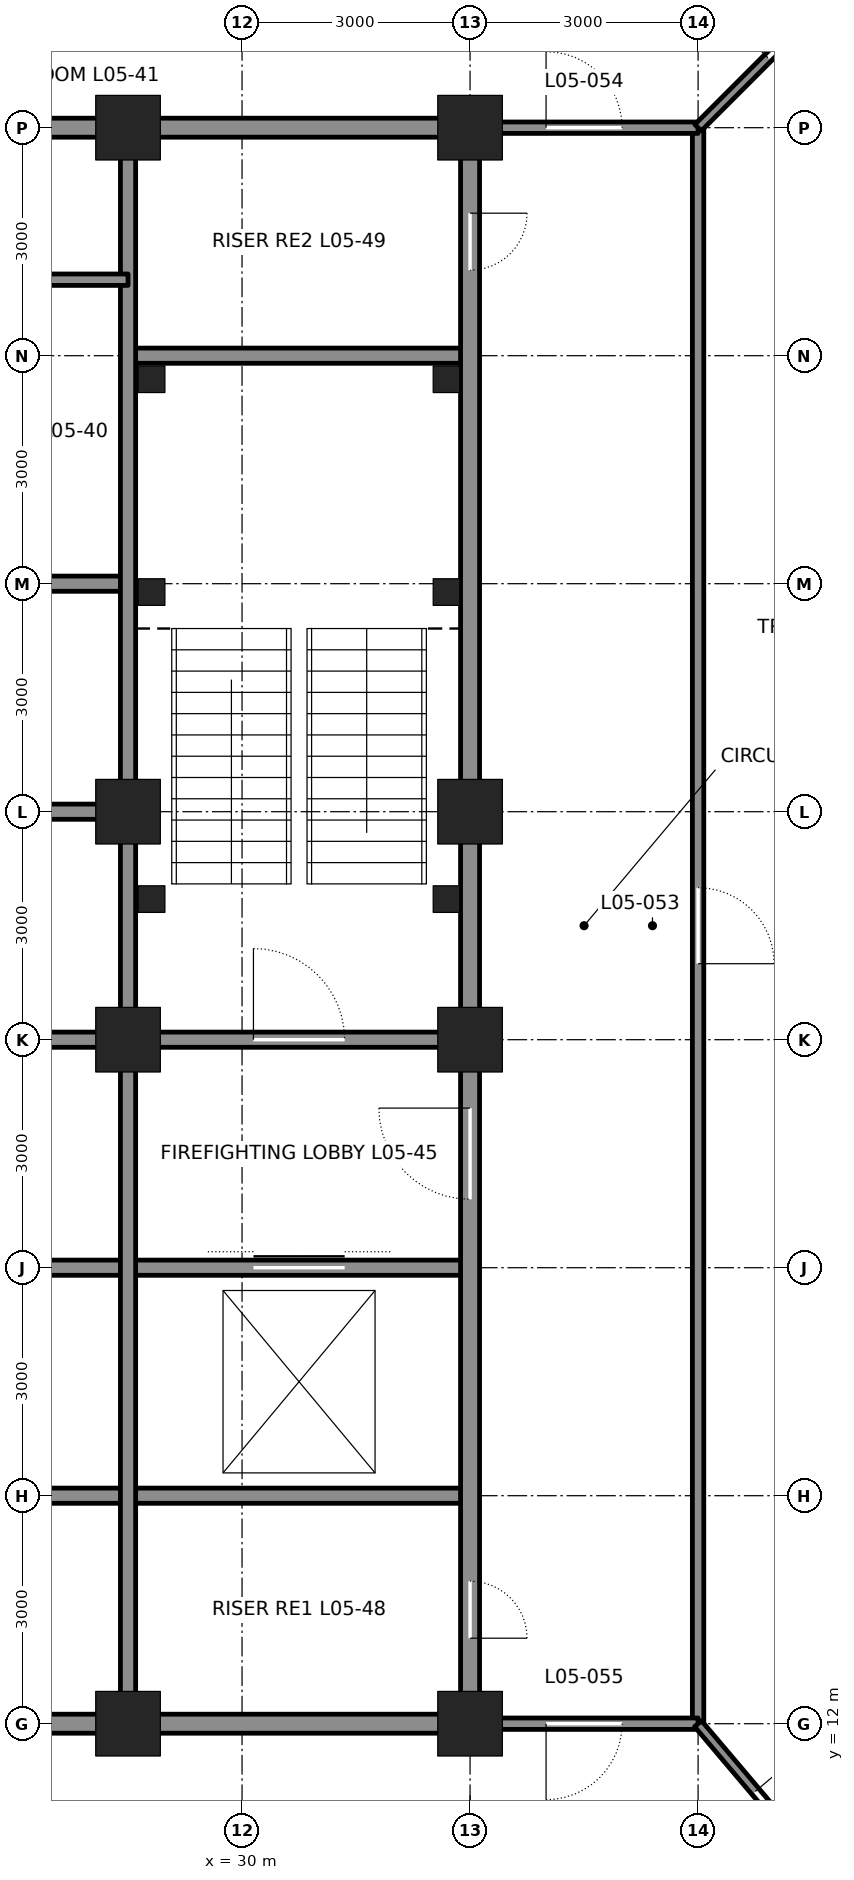
"""IFC4 building model, lengths in metres.
Left out: names, types, materials, properties, quantities, classifications, styles, units other than length and angle.
Written with IfcOpenShell. Run it as: python <this file> out.ifc"""

import sys

from ifc_helpers import new_model, si_unit, direction, frame, frame_2d, origin, origin_2d, place, context, subcontext, project, spatial, rectangle, hollow_rectangle, extrude, element, fill, save


model = new_model("IFC4")
c1 = context("Model", 3, precision=1e-05, world=origin(), true_north=direction((0.0, 1.0)))
c2 = subcontext(c1, "Body", "Model", "MODEL_VIEW")
j1 = project(units=[si_unit("LENGTHUNIT", "METRE"), si_unit("PLANEANGLEUNIT", "RADIAN")], contexts=[c1])
p1 = place(None, origin())
s1 = spatial("IfcSite", under=j1, at=p1, CompositionType="ELEMENT")
p2 = place(p1, origin())
s2 = spatial("IfcBuilding", under=s1, at=p2, CompositionType="ELEMENT")
p3 = place(p2, frame((0.0, 0.0, 28.8)))
s3 = spatial("IfcBuildingStorey", under=s2, at=p3, CompositionType="ELEMENT", Elevation=28.8)
for number, where, z_axis, x_axis in (
    (1, (28.5, 12.0, 0.0), (0.0, 0.0, 1.0), (1.0, 0.0, 0.0)),
    (2, (33.0, 12.0, 0.0), (0.0, 0.0, 1.0), (1.0, 0.0, 0.0)),
    (3, (28.5, 33.0, 0.0), (0.0, 0.0, 1.0), (1.0, 0.0, 0.0)),
    (4, (33.0, 33.0, 0.0), (0.0, 0.0, 1.0), (1.0, 0.0, 0.0)),
    (5, (33.0, 21.0, 0.0), (0.0, 0.0, 1.0), (1.0, 0.0, 0.0)),
    (6, (33.0, 24.0, 0.0), (0.0, 0.0, 1.0), (1.0, 0.0, 0.0)),
    (7, (28.5, 21.0, 0.0), (0.0, 0.0, 1.0), (1.0, 0.0, 0.0)),
    (8, (28.5, 24.0, 0.0), (0.0, 0.0, 1.0), (1.0, 0.0, 0.0)),
):
    element("IfcColumn", number, at=place(p3, frame(where, z_axis=z_axis, x_axis=x_axis)), inside=s3, PredefinedType="COLUMN", context=c2, shape_type="SweptSolid", body=[
        extrude(hollow_rectangle(XDim=0.85, YDim=0.85, WallThickness=0.085, at=origin_2d()), origin(), (0.0, 0.0, 1.0), 4.5),
    ])
p4 = place(p3, frame((25.75, 12.0, 0.0), z_axis=(0.0, 0.0, 1.0), x_axis=(1.0, 0.0, 0.0)))
e9 = element("IfcWall", 9, at=p4, inside=s3, PredefinedType="SOLIDWALL", context=c2, shape_type="SweptSolid", body=[
    extrude(rectangle(XDim=2.5, YDim=0.25, at=frame_2d((1.25, 0.0))), origin(), (0.0, 0.0, 1.0), 3.181),
])
p5 = place(p3, frame((28.75, 12.0, 0.0), z_axis=(0.0, 0.0, 1.0), x_axis=(1.0, 0.0, 0.0)))
e10 = element("IfcWall", 10, at=p5, inside=s3, PredefinedType="SOLIDWALL", context=c2, shape_type="SweptSolid", body=[
    extrude(rectangle(XDim=4.0, YDim=0.25, at=frame_2d((2.0, 0.0))), origin(), (0.0, 0.0, 1.0), 3.181),
])
p6 = place(p3, frame((25.5, 15.0, 0.0), z_axis=(0.0, 0.0, 1.0), x_axis=(1.0, 0.0, 0.0)))
e11 = element("IfcWall", 11, at=p6, inside=s3, PredefinedType="SOLIDWALL", context=c2, shape_type="SweptSolid", body=[
    extrude(rectangle(XDim=7.5, YDim=0.2, at=frame_2d((3.75, 0.0))), origin(), (0.0, 0.0, 1.0), 4.34),
])
p7 = place(p3, frame((25.5, 24.0, 0.0), z_axis=(0.0, 0.0, 1.0), x_axis=(1.0, 0.0, 0.0)))
e12 = element("IfcWall", 12, at=p7, inside=s3, PredefinedType="SOLIDWALL", context=c2, shape_type="SweptSolid", body=[
    extrude(rectangle(XDim=2.75, YDim=0.2, at=frame_2d((1.375, 0.0))), origin(), (0.0, 0.0, 1.0), 3.39),
])
p8 = place(p3, frame((25.5, 27.0, 0.0), z_axis=(0.0, 0.0, 1.0), x_axis=(1.0, 0.0, 0.0)))
e13 = element("IfcWall", 13, at=p8, inside=s3, PredefinedType="SOLIDWALL", context=c2, shape_type="SweptSolid", body=[
    extrude(rectangle(XDim=3.0, YDim=0.2, at=frame_2d((1.5, 0.0))), origin(), (0.0, 0.0, 1.0), 4.34),
])
p9 = place(p3, frame((28.5, 30.0, 0.0), z_axis=(0.0, 0.0, 1.0), x_axis=(1.0, 0.0, 0.0)))
e14 = element("IfcWall", 14, at=p9, inside=s3, PredefinedType="SOLIDWALL", context=c2, shape_type="SweptSolid", body=[
    extrude(rectangle(XDim=4.5, YDim=0.2, at=frame_2d((2.25, 0.0))), origin(), (0.0, 0.0, 1.0), 4.34),
])
p10 = place(p3, frame((25.75, 33.0, 0.0), z_axis=(0.0, 0.0, 1.0), x_axis=(1.0, 0.0, 0.0)))
e15 = element("IfcWall", 15, at=p10, inside=s3, PredefinedType="SOLIDWALL", context=c2, shape_type="SweptSolid", body=[
    extrude(rectangle(XDim=2.5, YDim=0.25, at=frame_2d((1.25, 0.0))), origin(), (0.0, 0.0, 1.0), 3.181),
])
p11 = place(p3, frame((28.75, 33.0, 0.0), z_axis=(0.0, 0.0, 1.0), x_axis=(1.0, 0.0, 0.0)))
e16 = element("IfcWall", 16, at=p11, inside=s3, PredefinedType="SOLIDWALL", context=c2, shape_type="SweptSolid", body=[
    extrude(rectangle(XDim=4.0, YDim=0.25, at=frame_2d((2.0, 0.0))), origin(), (0.0, 0.0, 1.0), 3.181),
])
p12 = place(p3, frame((25.5, 18.0, 0.0), z_axis=(0.0, 0.0, 1.0), x_axis=(1.0, 0.0, 0.0)))
e17 = element("IfcWall", 17, at=p12, inside=s3, PredefinedType="SOLIDWALL", context=c2, shape_type="SweptSolid", body=[
    extrude(rectangle(XDim=7.5, YDim=0.2, at=frame_2d((3.75, 0.0))), origin(), (0.0, 0.0, 1.0), 4.34),
])
p13 = place(p12, frame((4.65, 0.0, 0.0)))
e18 = element("IfcOpeningElement", 18, at=p13, cuts=e17, PredefinedType="OPENING", context=c2, shape_type="SweptSolid", body=[
    extrude(rectangle(XDim=1.2, YDim=2.1, at=frame_2d((0.6, 1.05))), frame((0.0, 0.11, 0.0), z_axis=(0.0, -1.0, 0.0), x_axis=(1.0, 0.0, 0.0)), (0.0, 0.0, 1.0), 0.22),
])
p14 = place(p3, frame((25.5, 21.0, 0.0), z_axis=(0.0, 0.0, 1.0), x_axis=(1.0, 0.0, 0.0)))
e19 = element("IfcWall", 19, at=p14, inside=s3, PredefinedType="SOLIDWALL", context=c2, shape_type="SweptSolid", body=[
    extrude(rectangle(XDim=2.75, YDim=0.2, at=frame_2d((1.375, 0.0))), origin(), (0.0, 0.0, 1.0), 3.39),
])
p15 = place(p3, frame((28.75, 21.0, 0.0), z_axis=(0.0, 0.0, 1.0), x_axis=(1.0, 0.0, 0.0)))
e20 = element("IfcWall", 20, at=p15, inside=s3, PredefinedType="SOLIDWALL", context=c2, shape_type="SweptSolid", body=[
    extrude(rectangle(XDim=4.0, YDim=0.2, at=frame_2d((2.0, 0.0))), origin(), (0.0, 0.0, 1.0), 3.39),
])
p16 = place(p15, frame((1.4, 0.0, 0.0)))
e21 = element("IfcOpeningElement", 21, at=p16, cuts=e20, PredefinedType="OPENING", context=c2, shape_type="SweptSolid", body=[
    extrude(rectangle(XDim=1.2, YDim=2.1, at=frame_2d((0.6, 1.05))), frame((0.0, 0.11, 0.0), z_axis=(0.0, -1.0, 0.0), x_axis=(1.0, 0.0, 0.0)), (0.0, 0.0, 1.0), 0.22),
])
p17 = place(p3, frame((28.5, 12.25, 0.0), z_axis=(0.0, 0.0, 1.0), x_axis=(0.0, 1.0, 0.0)))
e22 = element("IfcWall", 22, at=p17, inside=s3, PredefinedType="SOLIDWALL", context=c2, shape_type="SweptSolid", body=[
    extrude(rectangle(XDim=8.5, YDim=0.2, at=frame_2d((4.25, 0.0))), origin(), (0.0, 0.0, 1.0), 3.413),
])
p18 = place(p3, frame((28.5, 21.25, 0.0), z_axis=(0.0, 0.0, 1.0), x_axis=(0.0, 1.0, 0.0)))
e23 = element("IfcWall", 23, at=p18, inside=s3, PredefinedType="SOLIDWALL", context=c2, shape_type="SweptSolid", body=[
    extrude(rectangle(XDim=2.5, YDim=0.2, at=frame_2d((1.25, 0.0))), origin(), (0.0, 0.0, 1.0), 3.413),
])
p19 = place(p3, frame((28.5, 24.25, 0.0), z_axis=(0.0, 0.0, 1.0), x_axis=(0.0, 1.0, 0.0)))
e24 = element("IfcWall", 24, at=p19, inside=s3, PredefinedType="SOLIDWALL", context=c2, shape_type="SweptSolid", body=[
    extrude(rectangle(XDim=8.5, YDim=0.2, at=frame_2d((4.25, 0.0))), origin(), (0.0, 0.0, 1.0), 3.413),
])
p20 = place(p3, frame((33.0, 12.25, 0.0), z_axis=(0.0, 0.0, 1.0), x_axis=(0.0, 1.0, 0.0)))
e25 = element("IfcWall", 25, at=p20, inside=s3, PredefinedType="SOLIDWALL", context=c2, shape_type="SweptSolid", body=[
    extrude(rectangle(XDim=8.5, YDim=0.25, at=frame_2d((4.25, 0.0))), origin(), (0.0, 0.0, 1.0), 3.113),
])
p21 = place(p20, frame((6.65, 0.0, 0.0)))
e26 = element("IfcOpeningElement", 26, at=p21, cuts=e25, PredefinedType="OPENING", context=c2, shape_type="SweptSolid", body=[
    extrude(rectangle(XDim=1.2, YDim=2.1, at=frame_2d((0.6, 1.05))), frame((0.0, 0.135, 0.0), z_axis=(0.0, -1.0, 0.0), x_axis=(1.0, 0.0, 0.0)), (0.0, 0.0, 1.0), 0.27),
])
p22 = place(p20, frame((0.875, 0.0, 0.0)))
e27 = element("IfcOpeningElement", 27, at=p22, cuts=e25, PredefinedType="OPENING", context=c2, shape_type="SweptSolid", body=[
    extrude(rectangle(XDim=0.75, YDim=2.1, at=frame_2d((0.375, 1.05))), frame((0.0, 0.135, 0.0), z_axis=(0.0, -1.0, 0.0), x_axis=(1.0, 0.0, 0.0)), (0.0, 0.0, 1.0), 0.27),
])
p23 = place(p3, frame((33.0, 21.25, 0.0), z_axis=(0.0, 0.0, 1.0), x_axis=(0.0, 1.0, 0.0)))
e28 = element("IfcWall", 28, at=p23, inside=s3, PredefinedType="SOLIDWALL", context=c2, shape_type="SweptSolid", body=[
    extrude(rectangle(XDim=2.5, YDim=0.25, at=frame_2d((1.25, 0.0))), origin(), (0.0, 0.0, 1.0), 3.113),
])
p24 = place(p3, frame((33.0, 24.25, 0.0), z_axis=(0.0, 0.0, 1.0), x_axis=(0.0, 1.0, 0.0)))
e29 = element("IfcWall", 29, at=p24, inside=s3, PredefinedType="SOLIDWALL", context=c2, shape_type="SweptSolid", body=[
    extrude(rectangle(XDim=8.5, YDim=0.25, at=frame_2d((4.25, 0.0))), origin(), (0.0, 0.0, 1.0), 3.113),
])
p25 = place(p24, frame((6.875, 0.0, 0.0)))
e30 = element("IfcOpeningElement", 30, at=p25, cuts=e29, PredefinedType="OPENING", context=c2, shape_type="SweptSolid", body=[
    extrude(rectangle(XDim=0.75, YDim=2.1, at=frame_2d((0.375, 1.05))), frame((0.0, 0.135, 0.0), z_axis=(0.0, -1.0, 0.0), x_axis=(1.0, 0.0, 0.0)), (0.0, 0.0, 1.0), 0.27),
])
p26 = place(p3, frame((25.5, 31.0, 0.0), z_axis=(0.0, 0.0, 1.0), x_axis=(1.0, 0.0, 0.0)))
e31 = element("IfcWall", 31, at=p26, inside=s3, PredefinedType="PARTITIONING", context=c2, shape_type="SweptSolid", body=[
    extrude(rectangle(XDim=3.0, YDim=0.15, at=frame_2d((1.5, 0.0))), origin(), (0.0, 0.0, 1.0), 4.34),
])
p27 = place(p3, frame((36.0, 12.0, -0.3), z_axis=(0.0, 0.0, 1.0), x_axis=(0.0, 1.0, 0.0)))
e32 = element("IfcWall", 32, at=p27, inside=s3, PredefinedType="PARTITIONING", context=c2, shape_type="SweptSolid", body=[
    extrude(rectangle(XDim=21.0, YDim=0.15, at=frame_2d((10.5, 0.0))), origin(), (0.0, 0.0, 1.0), 4.34),
])
p28 = place(p27, frame((10.0, 0.0, 0.3)))
e33 = element("IfcOpeningElement", 33, at=p28, cuts=e32, PredefinedType="OPENING", context=c2, shape_type="SweptSolid", body=[
    extrude(rectangle(XDim=1.0, YDim=2.4, at=frame_2d((0.5, 1.2))), frame((0.0, 0.085, 0.0), z_axis=(0.0, -1.0, 0.0), x_axis=(1.0, 0.0, 0.0)), (0.0, 0.0, 1.0), 0.17),
])
p29 = place(p3, frame((33.0, 33.0, -0.3), z_axis=(0.0, 0.0, 1.0), x_axis=(1.0, 0.0, 0.0)))
e34 = element("IfcWall", 34, at=p29, inside=s3, PredefinedType="PARTITIONING", context=c2, shape_type="SweptSolid", body=[
    extrude(rectangle(XDim=3.0, YDim=0.15, at=frame_2d((1.5, 0.0))), origin(), (0.0, 0.0, 1.0), 3.481),
])
p30 = place(p29, frame((1.0, 0.0, 0.3)))
e35 = element("IfcOpeningElement", 35, at=p30, cuts=e34, PredefinedType="OPENING", context=c2, shape_type="SweptSolid", body=[
    extrude(rectangle(XDim=1.0, YDim=2.4, at=frame_2d((0.5, 1.2))), frame((0.0, 0.085, 0.0), z_axis=(0.0, -1.0, 0.0), x_axis=(1.0, 0.0, 0.0)), (0.0, 0.0, 1.0), 0.17),
])
p31 = place(p3, frame((33.0, 12.0, -0.3), z_axis=(0.0, 0.0, 1.0), x_axis=(1.0, 0.0, 0.0)))
e36 = element("IfcWall", 36, at=p31, inside=s3, PredefinedType="PARTITIONING", context=c2, shape_type="SweptSolid", body=[
    extrude(rectangle(XDim=3.0, YDim=0.15, at=frame_2d((1.5, 0.0))), origin(), (0.0, 0.0, 1.0), 3.481),
])
p32 = place(p31, frame((1.0, 0.0, 0.3)))
e37 = element("IfcOpeningElement", 37, at=p32, cuts=e36, PredefinedType="OPENING", context=c2, shape_type="SweptSolid", body=[
    extrude(rectangle(XDim=1.0, YDim=2.4, at=frame_2d((0.5, 1.2))), frame((0.0, 0.085, 0.0), z_axis=(0.0, -1.0, 0.0), x_axis=(1.0, 0.0, 0.0)), (0.0, 0.0, 1.0), 0.17),
])
p33 = place(p3, frame((36.0, 33.0, -0.3), z_axis=(0.0, 0.0, 1.0), x_axis=(0.707106781187, 0.707106781187, 0.0)))
e38 = element("IfcWall", 38, at=p33, inside=s3, PredefinedType="PARTITIONING", context=c2, shape_type="SweptSolid", body=[
    extrude(rectangle(XDim=11.842, YDim=0.12, at=frame_2d((5.921, 0.0))), origin(), (0.0, 0.0, 1.0), 4.34),
])
p34 = place(p33, frame((1.3, 0.0, 0.3)))
e39 = element("IfcOpeningElement", 39, at=p34, cuts=e38, PredefinedType="OPENING", context=c2, shape_type="SweptSolid", body=[
    extrude(rectangle(XDim=1.0, YDim=2.4, at=frame_2d((0.5, 1.2))), frame((0.0, 0.07, 0.0), z_axis=(0.0, -1.0, 0.0), x_axis=(1.0, 0.0, 0.0)), (0.0, 0.0, 1.0), 0.14),
])
p35 = place(p3, frame((36.0, 12.0, -0.3), z_axis=(0.0, 0.0, 1.0), x_axis=(0.645783707661, -0.763520401116, 0.0)))
e40 = element("IfcWall", 40, at=p35, inside=s3, PredefinedType="PARTITIONING", context=c2, shape_type="SweptSolid", body=[
    extrude(rectangle(XDim=8.906, YDim=0.12, at=frame_2d((4.453, 0.0))), origin(), (0.0, 0.0, 1.0), 4.34),
])
p36 = place(p35, frame((1.167, 0.0, 0.3)))
e41 = element("IfcOpeningElement", 41, at=p36, cuts=e40, PredefinedType="OPENING", context=c2, shape_type="SweptSolid", body=[
    extrude(rectangle(XDim=1.0, YDim=2.4, at=frame_2d((0.5, 1.2))), frame((0.0, 0.07, 0.0), z_axis=(0.0, -1.0, 0.0), x_axis=(1.0, 0.0, 0.0)), (0.0, 0.0, 1.0), 0.14),
])
for number, where, z_axis, x_axis in (
    (42, (28.81, 29.69, 0.0), (0.0, 0.0, 1.0), (1.0, 0.0, 0.0)),
    (43, (32.69, 29.69, 0.0), (0.0, 0.0, 1.0), (1.0, 0.0, 0.0)),
    (44, (28.81, 26.89, 0.0), (0.0, 0.0, 1.0), (1.0, 0.0, 0.0)),
    (45, (32.69, 26.89, 0.0), (0.0, 0.0, 1.0), (1.0, 0.0, 0.0)),
    (46, (28.81, 22.85, 0.0), (0.0, 0.0, 1.0), (1.0, 0.0, 0.0)),
    (47, (32.69, 22.85, 0.0), (0.0, 0.0, 1.0), (1.0, 0.0, 0.0)),
):
    element("IfcColumn", number, at=place(p3, frame(where, z_axis=z_axis, x_axis=x_axis)), inside=s3, PredefinedType="COLUMN", context=c2, shape_type="SweptSolid", body=[
        extrude(hollow_rectangle(XDim=0.35, YDim=0.35, WallThickness=0.035, at=origin_2d()), origin(), (0.0, 0.0, 1.0), 4.5),
    ])
p37 = place(p16, origin())
e48 = element("IfcDoor", 48, at=p37, inside=s3, OperationType="SINGLE_SWING_LEFT", PredefinedType="DOOR", context=c2, shape_type="SweptSolid", body=[
    extrude(rectangle(XDim=1.2, YDim=2.1, at=frame_2d((0.6, 1.05))), frame((0.0, 0.025, 0.0), z_axis=(0.0, -1.0, 0.0), x_axis=(1.0, 0.0, 0.0)), (0.0, 0.0, 1.0), 0.05),
])
fill(e21, e48)
p38 = place(p21, origin())
e49 = element("IfcDoor", 49, at=p38, inside=s3, OperationType="SINGLE_SWING_RIGHT", PredefinedType="DOOR", context=c2, shape_type="SweptSolid", body=[
    extrude(rectangle(XDim=1.2, YDim=2.1, at=frame_2d((0.6, 1.05))), frame((0.0, 0.025, 0.0), z_axis=(0.0, -1.0, 0.0), x_axis=(1.0, 0.0, 0.0)), (0.0, 0.0, 1.0), 0.05),
])
fill(e26, e49)
p39 = place(p13, origin())
e50 = element("IfcDoor", 50, at=p39, inside=s3, OperationType="DOUBLE_DOOR_SLIDING", PredefinedType="DOOR", context=c2, shape_type="SweptSolid", body=[
    extrude(rectangle(XDim=1.2, YDim=2.1, at=frame_2d((0.6, 1.05))), frame((0.0, 0.025, 0.0), z_axis=(0.0, -1.0, 0.0), x_axis=(1.0, 0.0, 0.0)), (0.0, 0.0, 1.0), 0.05),
])
fill(e18, e50)
p40 = place(p22, frame((0.75, 0.0, 0.0), z_axis=(0.0, 0.0, 1.0), x_axis=(-1.0, 0.0, 0.0)))
e51 = element("IfcDoor", 51, at=p40, inside=s3, OperationType="SINGLE_SWING_RIGHT", PredefinedType="DOOR", context=c2, shape_type="SweptSolid", body=[
    extrude(rectangle(XDim=0.75, YDim=2.1, at=frame_2d((0.375, 1.05))), frame((0.0, 0.025, 0.0), z_axis=(0.0, -1.0, 0.0), x_axis=(1.0, 0.0, 0.0)), (0.0, 0.0, 1.0), 0.05),
])
fill(e27, e51)
p41 = place(p25, frame((0.75, 0.0, 0.0), z_axis=(0.0, 0.0, 1.0), x_axis=(-1.0, 0.0, 0.0)))
e52 = element("IfcDoor", 52, at=p41, inside=s3, OperationType="SINGLE_SWING_LEFT", PredefinedType="DOOR", context=c2, shape_type="SweptSolid", body=[
    extrude(rectangle(XDim=0.75, YDim=2.1, at=frame_2d((0.375, 1.05))), frame((0.0, 0.025, 0.0), z_axis=(0.0, -1.0, 0.0), x_axis=(1.0, 0.0, 0.0)), (0.0, 0.0, 1.0), 0.05),
])
fill(e30, e52)
p42 = place(p28, frame((1.0, 0.0, 0.0), z_axis=(0.0, 0.0, 1.0), x_axis=(-1.0, 0.0, 0.0)))
e53 = element("IfcDoor", 53, at=p42, inside=s3, OperationType="SINGLE_SWING_RIGHT", PredefinedType="DOOR", context=c2, shape_type="SweptSolid", body=[
    extrude(rectangle(XDim=1.0, YDim=2.4, at=frame_2d((0.5, 1.2))), frame((0.0, 0.025, 0.0), z_axis=(0.0, -1.0, 0.0), x_axis=(1.0, 0.0, 0.0)), (0.0, 0.0, 1.0), 0.05),
])
fill(e33, e53)
p43 = place(p30, origin())
e54 = element("IfcDoor", 54, at=p43, inside=s3, OperationType="SINGLE_SWING_LEFT", PredefinedType="DOOR", context=c2, shape_type="SweptSolid", body=[
    extrude(rectangle(XDim=1.0, YDim=2.4, at=frame_2d((0.5, 1.2))), frame((0.0, 0.025, 0.0), z_axis=(0.0, -1.0, 0.0), x_axis=(1.0, 0.0, 0.0)), (0.0, 0.0, 1.0), 0.05),
])
fill(e35, e54)
p44 = place(p32, frame((1.0, 0.0, 0.0), z_axis=(0.0, 0.0, 1.0), x_axis=(-1.0, 0.0, 0.0)))
e55 = element("IfcDoor", 55, at=p44, inside=s3, OperationType="SINGLE_SWING_RIGHT", PredefinedType="DOOR", context=c2, shape_type="SweptSolid", body=[
    extrude(rectangle(XDim=1.0, YDim=2.4, at=frame_2d((0.5, 1.2))), frame((0.0, 0.025, 0.0), z_axis=(0.0, -1.0, 0.0), x_axis=(1.0, 0.0, 0.0)), (0.0, 0.0, 1.0), 0.05),
])
fill(e37, e55)
p45 = place(p34, origin())
e56 = element("IfcDoor", 56, at=p45, inside=s3, OperationType="SINGLE_SWING_LEFT", PredefinedType="DOOR", context=c2, shape_type="SweptSolid", body=[
    extrude(rectangle(XDim=1.0, YDim=2.4, at=frame_2d((0.5, 1.2))), frame((0.0, 0.025, 0.0), z_axis=(0.0, -1.0, 0.0), x_axis=(1.0, 0.0, 0.0)), (0.0, 0.0, 1.0), 0.05),
])
fill(e39, e56)
p46 = place(p36, origin())
e57 = element("IfcDoor", 57, at=p46, inside=s3, OperationType="SINGLE_SWING_LEFT", PredefinedType="DOOR", context=c2, shape_type="SweptSolid", body=[
    extrude(rectangle(XDim=1.0, YDim=2.4, at=frame_2d((0.5, 1.2))), frame((0.0, 0.025, 0.0), z_axis=(0.0, -1.0, 0.0), x_axis=(1.0, 0.0, 0.0)), (0.0, 0.0, 1.0), 0.05),
])
fill(e41, e57)
save(model, sys.argv[1])
